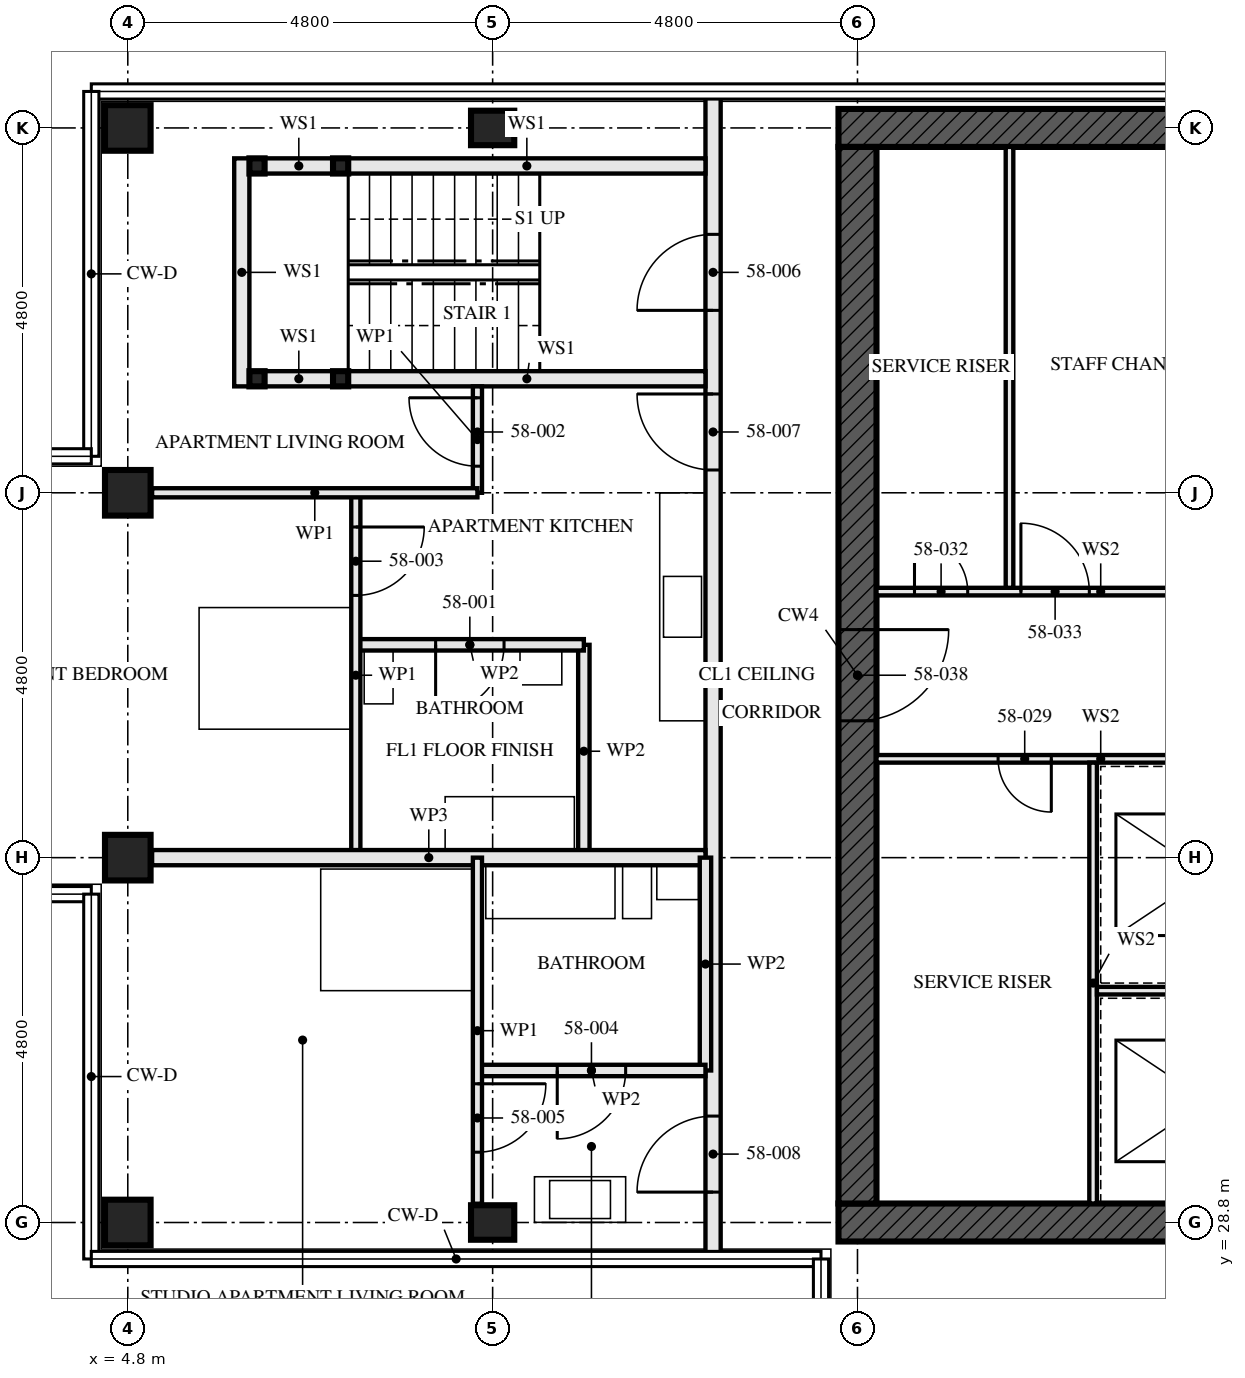
"""IFC4 building model, lengths in metres.
Left out: names, types, materials, properties, quantities, classifications, styles, units other than length and angle.
Written with IfcOpenShell. Run it as: python <this file> out.ifc"""

import sys

from ifc_helpers import new_model, si_unit, direction, frame, frame_2d, origin, origin_2d, place, context, subcontext, project, spatial, rectangle, hollow_rectangle, i_section, extrude, element, fill, save


model = new_model("IFC4")
c1 = context("Model", 3, precision=1e-05, world=origin(), true_north=direction((0.0, 1.0)))
c2 = subcontext(c1, "Body", "Model", "MODEL_VIEW")
j1 = project(units=[si_unit("LENGTHUNIT", "METRE"), si_unit("PLANEANGLEUNIT", "RADIAN")], contexts=[c1])
p1 = place(None, origin())
s1 = spatial("IfcSite", under=j1, at=p1, CompositionType="ELEMENT")
p2 = place(p1, origin())
s2 = spatial("IfcBuilding", under=s1, at=p2, CompositionType="ELEMENT")
p3 = place(p2, frame((0.0, 0.0, 212.0)))
s3 = spatial("IfcBuildingStorey", under=s2, at=p3, CompositionType="ELEMENT", Elevation=212.0)
for number, where, z_axis, x_axis in (
    (1, (4.8, 28.8, 0.0), (0.0, 0.0, 1.0), (0.0, 1.0, 0.0)),
    (2, (4.8, 33.6, 0.0), (0.0, 0.0, 1.0), (0.0, 1.0, 0.0)),
    (3, (4.8, 38.4, 0.0), (0.0, 0.0, 1.0), (0.0, 1.0, 0.0)),
    (4, (4.8, 43.2, 0.0), (0.0, 0.0, 1.0), (0.0, 1.0, 0.0)),
):
    element("IfcColumn", number, at=place(p3, frame(where, z_axis=z_axis, x_axis=x_axis)), inside=s3, PredefinedType="COLUMN", context=c2, shape_type="SweptSolid", body=[
        extrude(hollow_rectangle(XDim=0.6, YDim=0.6, WallThickness=0.05, at=origin_2d()), origin(), (0.0, 0.0, 1.0), 3.5),
    ])
for number, where, z_axis, x_axis in (
    (5, (9.6, 28.8, 0.0), (0.0, 0.0, 1.0), (0.0, 1.0, 0.0)),
    (6, (9.6, 43.2, 0.0), (0.0, 0.0, 1.0), (0.0, 1.0, 0.0)),
):
    element("IfcColumn", number, at=place(p3, frame(where, z_axis=z_axis, x_axis=x_axis)), inside=s3, PredefinedType="COLUMN", context=c2, shape_type="SweptSolid", body=[
        extrude(i_section(OverallWidth=0.454, OverallDepth=0.569, WebThickness=0.078, FlangeThickness=0.125, FilletRadius=0.015, at=origin_2d()), origin(), (0.0, 0.0, 1.0), 3.5),
    ])
p4 = place(p3, frame((14.15, 28.8, -0.17), z_axis=(0.0, 0.0, 1.0), x_axis=(1.0, 0.0, 0.0)))
e7 = element("IfcWall", 7, at=p4, inside=s3, PredefinedType="SHEAR", context=c2, shape_type="SweptSolid", body=[
    extrude(rectangle(XDim=14.9, YDim=0.5, at=frame_2d((7.45, 0.0))), origin(), (0.0, 0.0, 1.0), 3.5),
])
p5 = place(p4, frame((6.85, 0.0, 0.17)))
e8 = element("IfcOpeningElement", 8, at=p5, cuts=e7, PredefinedType="OPENING", context=c2, shape_type="SweptSolid", body=[
    extrude(rectangle(XDim=1.2, YDim=2.1, at=frame_2d((0.6, 1.05))), frame((0.0, 0.26, 0.0), z_axis=(0.0, -1.0, 0.0), x_axis=(1.0, 0.0, 0.0)), (0.0, 0.0, 1.0), 0.521),
])
p6 = place(p3, frame((29.05, 43.2, -0.17), z_axis=(0.0, 0.0, 1.0), x_axis=(-1.0, 0.0, 0.0)))
e9 = element("IfcWall", 9, at=p6, inside=s3, PredefinedType="SHEAR", context=c2, shape_type="SweptSolid", body=[
    extrude(rectangle(XDim=14.9, YDim=0.5, at=frame_2d((7.45, 0.0))), origin(), (0.0, 0.0, 1.0), 3.5),
])
p7 = place(p3, frame((14.4, 42.95, -0.17), z_axis=(0.0, 0.0, 1.0), x_axis=(0.0, -1.0, 0.0)))
e10 = element("IfcWall", 10, at=p7, inside=s3, PredefinedType="SHEAR", context=c2, shape_type="SweptSolid", body=[
    extrude(rectangle(XDim=13.9, YDim=0.5, at=frame_2d((6.95, 0.0))), origin(), (0.0, 0.0, 1.0), 3.5),
])
p8 = place(p7, frame((6.35, 0.0, 0.17)))
e11 = element("IfcOpeningElement", 11, at=p8, cuts=e10, PredefinedType="OPENING", context=c2, shape_type="SweptSolid", body=[
    extrude(rectangle(XDim=1.2, YDim=2.1, at=frame_2d((0.6, 1.05))), frame((0.0, 0.26, 0.0), z_axis=(0.0, -1.0, 0.0), x_axis=(1.0, 0.0, 0.0)), (0.0, 0.0, 1.0), 0.521),
])
for number, where, z_axis, x_axis in (
    (12, (6.5, 42.7, 0.0), (0.0, 0.0, 1.0), (1.0, 0.0, 0.0)),
    (13, (6.5, 39.9, 0.0), (0.0, 0.0, 1.0), (1.0, 0.0, 0.0)),
    (14, (7.6, 42.7, 0.0), (0.0, 0.0, 1.0), (1.0, 0.0, 0.0)),
    (15, (7.6, 39.9, 0.0), (0.0, 0.0, 1.0), (1.0, 0.0, 0.0)),
):
    element("IfcColumn", number, at=place(p3, frame(where, z_axis=z_axis, x_axis=x_axis)), inside=s3, PredefinedType="COLUMN", context=c2, shape_type="SweptSolid", body=[
        extrude(hollow_rectangle(XDim=0.2, YDim=0.2, WallThickness=0.008, at=origin_2d()), origin(), (0.0, 0.0, 1.0), 3.33),
    ])
p9 = place(p3, frame((6.6, 42.7, 0.0), z_axis=(0.0, 0.0, 1.0), x_axis=(1.0, 0.0, 0.0)))
e16 = element("IfcWall", 16, at=p9, inside=s3, PredefinedType="SOLIDWALL", context=c2, shape_type="SweptSolid", body=[
    extrude(rectangle(XDim=0.9, YDim=0.2, at=frame_2d((0.45, 0.0))), origin(), (0.0, 0.0, 1.0), 2.99),
])
p10 = place(p3, frame((7.7, 42.7, 0.0), z_axis=(0.0, 0.0, 1.0), x_axis=(1.0, 0.0, 0.0)))
e17 = element("IfcWall", 17, at=p10, inside=s3, PredefinedType="SOLIDWALL", context=c2, shape_type="SweptSolid", body=[
    extrude(rectangle(XDim=4.7, YDim=0.2, at=frame_2d((2.35, 0.0))), origin(), (0.0, 0.0, 1.0), 2.99),
])
p11 = place(p3, frame((6.6, 39.9, 0.0), z_axis=(0.0, 0.0, 1.0), x_axis=(1.0, 0.0, 0.0)))
e18 = element("IfcWall", 18, at=p11, inside=s3, PredefinedType="SOLIDWALL", context=c2, shape_type="SweptSolid", body=[
    extrude(rectangle(XDim=0.9, YDim=0.2, at=frame_2d((0.45, 0.0))), origin(), (0.0, 0.0, 1.0), 2.99),
])
p12 = place(p3, frame((7.7, 39.9, 0.0), z_axis=(0.0, 0.0, 1.0), x_axis=(1.0, 0.0, 0.0)))
e19 = element("IfcWall", 19, at=p12, inside=s3, PredefinedType="SOLIDWALL", context=c2, shape_type="SweptSolid", body=[
    extrude(rectangle(XDim=4.7, YDim=0.2, at=frame_2d((2.35, 0.0))), origin(), (0.0, 0.0, 1.0), 2.99),
])
p13 = place(p3, frame((6.3, 42.8, 0.0), z_axis=(0.0, 0.0, 1.0), x_axis=(0.0, -1.0, 0.0)))
e20 = element("IfcWall", 20, at=p13, inside=s3, PredefinedType="SOLIDWALL", context=c2, shape_type="SweptSolid", body=[
    extrude(rectangle(XDim=3.0, YDim=0.2, at=frame_2d((1.5, 0.0))), origin(), (0.0, 0.0, 1.0), 3.33),
])
p14 = place(p3, frame((7.8, 36.4, 0.0), z_axis=(0.0, 0.0, 1.0), x_axis=(1.0, 0.0, 0.0)))
e21 = element("IfcWall", 21, at=p14, inside=s3, PredefinedType="PARTITIONING", context=c2, shape_type="SweptSolid", body=[
    extrude(rectangle(XDim=3.0, YDim=0.15, at=frame_2d((1.5, 0.0))), origin(), (0.0, 0.0, 1.0), 3.33),
])
p15 = place(p14, frame((1.05, 0.0, 0.0)))
e22 = element("IfcOpeningElement", 22, at=p15, cuts=e21, PredefinedType="OPENING", context=c2, shape_type="SweptSolid", body=[
    extrude(rectangle(XDim=0.9, YDim=2.1, at=frame_2d((0.45, 1.05))), frame((0.0, 0.085, 0.0), z_axis=(0.0, -1.0, 0.0), x_axis=(1.0, 0.0, 0.0)), (0.0, 0.0, 1.0), 0.171),
])
p16 = place(p3, frame((10.8, 36.4, 0.0), z_axis=(0.0, 0.0, 1.0), x_axis=(0.0, -1.0, 0.0)))
e23 = element("IfcWall", 23, at=p16, inside=s3, PredefinedType="PARTITIONING", context=c2, shape_type="SweptSolid", body=[
    extrude(rectangle(XDim=2.8, YDim=0.15, at=frame_2d((1.4, 0.0))), origin(), (0.0, 0.0, 1.0), 3.33),
])
p17 = place(p3, frame((9.4, 39.8, 0.0), z_axis=(0.0, 0.0, 1.0), x_axis=(0.0, -1.0, 0.0)))
e24 = element("IfcWall", 24, at=p17, inside=s3, PredefinedType="PARTITIONING", context=c2, shape_type="SweptSolid", body=[
    extrude(rectangle(XDim=1.4, YDim=0.12, at=frame_2d((0.7, 0.0))), origin(), (0.0, 0.0, 1.0), 3.33),
])
p18 = place(p17, frame((0.15, 0.0, 0.0)))
e25 = element("IfcOpeningElement", 25, at=p18, cuts=e24, PredefinedType="OPENING", context=c2, shape_type="SweptSolid", body=[
    extrude(rectangle(XDim=0.9, YDim=2.1, at=frame_2d((0.45, 1.05))), frame((0.0, 0.071, 0.0), z_axis=(0.0, -1.0, 0.0), x_axis=(1.0, 0.0, 0.0)), (0.0, 0.0, 1.0), 0.141),
])
p19 = place(p3, frame((7.8, 38.4, 0.0), z_axis=(0.0, 0.0, 1.0), x_axis=(0.0, -1.0, 0.0)))
e26 = element("IfcWall", 26, at=p19, inside=s3, PredefinedType="PARTITIONING", context=c2, shape_type="SweptSolid", body=[
    extrude(rectangle(XDim=4.8, YDim=0.12, at=frame_2d((2.4, 0.0))), origin(), (0.0, 0.0, 1.0), 3.33),
])
p20 = place(p19, frame((0.45, 0.0, 0.0)))
e27 = element("IfcOpeningElement", 27, at=p20, cuts=e26, PredefinedType="OPENING", context=c2, shape_type="SweptSolid", body=[
    extrude(rectangle(XDim=0.9, YDim=2.1, at=frame_2d((0.45, 1.05))), frame((0.0, 0.071, 0.0), z_axis=(0.0, -1.0, 0.0), x_axis=(1.0, 0.0, 0.0)), (0.0, 0.0, 1.0), 0.141),
])
p21 = place(p3, frame((5.12, 38.4, 0.0), z_axis=(0.0, 0.0, 1.0), x_axis=(1.0, 0.0, 0.0)))
e28 = element("IfcWall", 28, at=p21, inside=s3, PredefinedType="PARTITIONING", context=c2, shape_type="SweptSolid", body=[
    extrude(rectangle(XDim=4.28, YDim=0.12, at=frame_2d((2.14, 0.0))), origin(), (0.0, 0.0, 1.0), 2.55),
])
p22 = place(p3, frame((5.12, 33.6, 0.0), z_axis=(0.0, 0.0, 1.0), x_axis=(1.0, 0.0, 0.0)))
e29 = element("IfcWall", 29, at=p22, inside=s3, PredefinedType="PARTITIONING", context=c2, shape_type="SweptSolid", body=[
    extrude(rectangle(XDim=7.28, YDim=0.2, at=frame_2d((3.64, 0.0))), origin(), (0.0, 0.0, 1.0), 2.55),
])
p23 = place(p3, frame((9.4, 30.8, 0.0), z_axis=(0.0, 0.0, 1.0), x_axis=(1.0, 0.0, 0.0)))
e30 = element("IfcWall", 30, at=p23, inside=s3, PredefinedType="PARTITIONING", context=c2, shape_type="SweptSolid", body=[
    extrude(rectangle(XDim=3.0, YDim=0.15, at=frame_2d((1.5, 0.0))), origin(), (0.0, 0.0, 1.0), 3.33),
])
p24 = place(p23, frame((1.05, 0.0, 0.0)))
e31 = element("IfcOpeningElement", 31, at=p24, cuts=e30, PredefinedType="OPENING", context=c2, shape_type="SweptSolid", body=[
    extrude(rectangle(XDim=0.9, YDim=2.1, at=frame_2d((0.45, 1.05))), frame((0.0, 0.085, 0.0), z_axis=(0.0, -1.0, 0.0), x_axis=(1.0, 0.0, 0.0)), (0.0, 0.0, 1.0), 0.171),
])
p25 = place(p3, frame((12.4, 33.6, 0.0), z_axis=(0.0, 0.0, 1.0), x_axis=(0.0, -1.0, 0.0)))
e32 = element("IfcWall", 32, at=p25, inside=s3, PredefinedType="PARTITIONING", context=c2, shape_type="SweptSolid", body=[
    extrude(rectangle(XDim=2.8, YDim=0.15, at=frame_2d((1.4, 0.0))), origin(), (0.0, 0.0, 1.0), 3.33),
])
p26 = place(p3, frame((9.4, 33.6, 0.0), z_axis=(0.0, 0.0, 1.0), x_axis=(0.0, -1.0, 0.0)))
e33 = element("IfcWall", 33, at=p26, inside=s3, PredefinedType="PARTITIONING", context=c2, shape_type="SweptSolid", body=[
    extrude(rectangle(XDim=4.553, YDim=0.12, at=frame_2d((2.276, 0.0))), origin(), (0.0, 0.0, 1.0), 3.33),
])
p27 = place(p26, frame((2.975, 0.0, 0.0)))
e34 = element("IfcOpeningElement", 34, at=p27, cuts=e33, PredefinedType="OPENING", context=c2, shape_type="SweptSolid", body=[
    extrude(rectangle(XDim=0.9, YDim=2.1, at=frame_2d((0.45, 1.05))), frame((0.0, 0.071, 0.0), z_axis=(0.0, -1.0, 0.0), x_axis=(1.0, 0.0, 0.0)), (0.0, 0.0, 1.0), 0.141),
])
p28 = place(p3, frame((12.5, 43.655, 0.0), z_axis=(0.0, 0.0, 1.0), x_axis=(0.0, -1.0, 0.0)))
e35 = element("IfcWall", 35, at=p28, inside=s3, PredefinedType="PARTITIONING", context=c2, shape_type="SweptSolid", body=[
    extrude(rectangle(XDim=15.31, YDim=0.2, at=frame_2d((7.655, 0.0))), origin(), (0.0, 0.0, 1.0), 2.32),
])
p29 = place(p28, frame((1.855, 0.0, 0.0)))
e36 = element("IfcOpeningElement", 36, at=p29, cuts=e35, PredefinedType="OPENING", context=c2, shape_type="SweptSolid", body=[
    extrude(rectangle(XDim=1.0, YDim=2.1, at=frame_2d((0.5, 1.05))), frame((0.0, 0.111, 0.0), z_axis=(0.0, -1.0, 0.0), x_axis=(1.0, 0.0, 0.0)), (0.0, 0.0, 1.0), 0.221),
])
p30 = place(p28, frame((3.955, 0.0, 0.0)))
e37 = element("IfcOpeningElement", 37, at=p30, cuts=e35, PredefinedType="OPENING", context=c2, shape_type="SweptSolid", body=[
    extrude(rectangle(XDim=1.0, YDim=2.1, at=frame_2d((0.5, 1.05))), frame((0.0, 0.111, 0.0), z_axis=(0.0, -1.0, 0.0), x_axis=(1.0, 0.0, 0.0)), (0.0, 0.0, 1.0), 0.221),
])
p31 = place(p28, frame((13.455, 0.0, 0.0)))
e38 = element("IfcOpeningElement", 38, at=p31, cuts=e35, PredefinedType="OPENING", context=c2, shape_type="SweptSolid", body=[
    extrude(rectangle(XDim=1.0, YDim=2.1, at=frame_2d((0.5, 1.05))), frame((0.0, 0.111, 0.0), z_axis=(0.0, -1.0, 0.0), x_axis=(1.0, 0.0, 0.0)), (0.0, 0.0, 1.0), 0.221),
])
p32 = place(p3, frame((16.4, 37.15, 0.0), z_axis=(0.0, 0.0, 1.0), x_axis=(0.0, 1.0, 0.0)))
e39 = element("IfcWall", 39, at=p32, inside=s3, PredefinedType="SOLIDWALL", context=c2, shape_type="SweptSolid", body=[
    extrude(rectangle(XDim=5.8, YDim=0.1, at=frame_2d((2.9, 0.0))), origin(), (0.0, 0.0, 1.0), 3.33),
])
p33 = place(p3, frame((14.65, 34.9, 0.0), z_axis=(0.0, 0.0, 1.0), x_axis=(1.0, 0.0, 0.0)))
e40 = element("IfcWall", 40, at=p33, inside=s3, PredefinedType="SOLIDWALL", context=c2, shape_type="SweptSolid", body=[
    extrude(rectangle(XDim=5.9, YDim=0.1, at=frame_2d((2.95, 0.0))), origin(), (0.0, 0.0, 1.0), 3.33),
])
p34 = place(p33, frame((1.6, 0.0, 0.0)))
e41 = element("IfcOpeningElement", 41, at=p34, cuts=e40, PredefinedType="OPENING", context=c2, shape_type="SweptSolid", body=[
    extrude(rectangle(XDim=0.7, YDim=2.1, at=frame_2d((0.35, 1.05))), frame((0.0, 0.061, 0.0), z_axis=(0.0, -1.0, 0.0), x_axis=(1.0, 0.0, 0.0)), (0.0, 0.0, 1.0), 0.121),
])
p35 = place(p3, frame((14.65, 37.1, 0.0), z_axis=(0.0, 0.0, 1.0), x_axis=(1.0, 0.0, 0.0)))
e42 = element("IfcWall", 42, at=p35, inside=s3, PredefinedType="SOLIDWALL", context=c2, shape_type="SweptSolid", body=[
    extrude(rectangle(XDim=5.9, YDim=0.1, at=frame_2d((2.95, 0.0))), origin(), (0.0, 0.0, 1.0), 3.33),
])
p36 = place(p35, frame((0.5, 0.0, 0.0)))
e43 = element("IfcOpeningElement", 43, at=p36, cuts=e42, PredefinedType="OPENING", context=c2, shape_type="SweptSolid", body=[
    extrude(rectangle(XDim=0.7, YDim=2.1, at=frame_2d((0.35, 1.05))), frame((0.0, 0.061, 0.0), z_axis=(0.0, -1.0, 0.0), x_axis=(1.0, 0.0, 0.0)), (0.0, 0.0, 1.0), 0.121),
])
p37 = place(p35, frame((1.9, 0.0, 0.0)))
e44 = element("IfcOpeningElement", 44, at=p37, cuts=e42, PredefinedType="OPENING", context=c2, shape_type="SweptSolid", body=[
    extrude(rectangle(XDim=0.9, YDim=2.1, at=frame_2d((0.45, 1.05))), frame((0.0, 0.061, 0.0), z_axis=(0.0, -1.0, 0.0), x_axis=(1.0, 0.0, 0.0)), (0.0, 0.0, 1.0), 0.121),
])
p38 = place(p3, frame((17.5, 29.05, 0.0), z_axis=(0.0, 0.0, 1.0), x_axis=(0.0, 1.0, 0.0)))
e45 = element("IfcWall", 45, at=p38, inside=s3, PredefinedType="SOLIDWALL", context=c2, shape_type="SweptSolid", body=[
    extrude(rectangle(XDim=5.8, YDim=0.1, at=frame_2d((2.9, 0.0))), origin(), (0.0, 0.0, 1.0), 3.33),
])
p39 = place(p3, frame((17.55, 31.85, 0.0), z_axis=(0.0, 0.0, 1.0), x_axis=(1.0, 0.0, 0.0)))
e46 = element("IfcWall", 46, at=p39, inside=s3, PredefinedType="SOLIDWALL", context=c2, shape_type="SweptSolid", body=[
    extrude(rectangle(XDim=2.9, YDim=0.1, at=frame_2d((1.45, 0.0))), origin(), (0.0, 0.0, 1.0), 3.33),
])
p40 = place(p15, frame((0.9, 0.0, 0.0), z_axis=(0.0, 0.0, 1.0), x_axis=(-1.0, 0.0, 0.0)))
e47 = element("IfcDoor", 47, at=p40, inside=s3, OperationType="SINGLE_SWING_LEFT", PredefinedType="DOOR", context=c2, shape_type="SweptSolid", body=[
    extrude(rectangle(XDim=0.9, YDim=2.1, at=frame_2d((0.45, 1.05))), frame((0.0, 0.022, 0.0), z_axis=(0.0, -1.0, 0.0), x_axis=(1.0, 0.0, 0.0)), (0.0, 0.0, 1.0), 0.044),
])
fill(e22, e47)
p41 = place(p18, frame((0.9, 0.0, 0.0), z_axis=(0.0, 0.0, 1.0), x_axis=(-1.0, 0.0, 0.0)))
e48 = element("IfcDoor", 48, at=p41, inside=s3, OperationType="SINGLE_SWING_LEFT", PredefinedType="DOOR", context=c2, shape_type="SweptSolid", body=[
    extrude(rectangle(XDim=0.9, YDim=2.1, at=frame_2d((0.45, 1.05))), frame((0.0, 0.022, 0.0), z_axis=(0.0, -1.0, 0.0), x_axis=(1.0, 0.0, 0.0)), (0.0, 0.0, 1.0), 0.044),
])
fill(e25, e48)
p42 = place(p20, origin())
e49 = element("IfcDoor", 49, at=p42, inside=s3, OperationType="SINGLE_SWING_RIGHT", PredefinedType="DOOR", context=c2, shape_type="SweptSolid", body=[
    extrude(rectangle(XDim=0.9, YDim=2.1, at=frame_2d((0.45, 1.05))), frame((0.0, 0.022, 0.0), z_axis=(0.0, -1.0, 0.0), x_axis=(1.0, 0.0, 0.0)), (0.0, 0.0, 1.0), 0.044),
])
fill(e27, e49)
p43 = place(p24, frame((0.9, 0.0, 0.0), z_axis=(0.0, 0.0, 1.0), x_axis=(-1.0, 0.0, 0.0)))
e50 = element("IfcDoor", 50, at=p43, inside=s3, OperationType="SINGLE_SWING_LEFT", PredefinedType="DOOR", context=c2, shape_type="SweptSolid", body=[
    extrude(rectangle(XDim=0.9, YDim=2.1, at=frame_2d((0.45, 1.05))), frame((0.0, 0.022, 0.0), z_axis=(0.0, -1.0, 0.0), x_axis=(1.0, 0.0, 0.0)), (0.0, 0.0, 1.0), 0.044),
])
fill(e31, e50)
p44 = place(p27, origin())
e51 = element("IfcDoor", 51, at=p44, inside=s3, OperationType="SINGLE_SWING_RIGHT", PredefinedType="DOOR", context=c2, shape_type="SweptSolid", body=[
    extrude(rectangle(XDim=0.9, YDim=2.1, at=frame_2d((0.45, 1.05))), frame((0.0, 0.022, 0.0), z_axis=(0.0, -1.0, 0.0), x_axis=(1.0, 0.0, 0.0)), (0.0, 0.0, 1.0), 0.044),
])
fill(e34, e51)
p45 = place(p29, frame((1.0, 0.0, 0.0), z_axis=(0.0, 0.0, 1.0), x_axis=(-1.0, 0.0, 0.0)))
e52 = element("IfcDoor", 52, at=p45, inside=s3, OperationType="SINGLE_SWING_RIGHT", PredefinedType="DOOR", context=c2, shape_type="SweptSolid", body=[
    extrude(rectangle(XDim=1.0, YDim=2.1, at=frame_2d((0.5, 1.05))), frame((0.0, 0.032, 0.0), z_axis=(0.0, -1.0, 0.0), x_axis=(1.0, 0.0, 0.0)), (0.0, 0.0, 1.0), 0.064),
])
fill(e36, e52)
p46 = place(p30, frame((1.0, 0.0, 0.0), z_axis=(0.0, 0.0, 1.0), x_axis=(-1.0, 0.0, 0.0)))
e53 = element("IfcDoor", 53, at=p46, inside=s3, OperationType="SINGLE_SWING_LEFT", PredefinedType="DOOR", context=c2, shape_type="SweptSolid", body=[
    extrude(rectangle(XDim=1.0, YDim=2.1, at=frame_2d((0.5, 1.05))), frame((0.0, 0.027, 0.0), z_axis=(0.0, -1.0, 0.0), x_axis=(1.0, 0.0, 0.0)), (0.0, 0.0, 1.0), 0.054),
])
fill(e37, e53)
p47 = place(p31, frame((1.0, 0.0, 0.0), z_axis=(0.0, 0.0, 1.0), x_axis=(-1.0, 0.0, 0.0)))
e54 = element("IfcDoor", 54, at=p47, inside=s3, OperationType="SINGLE_SWING_RIGHT", PredefinedType="DOOR", context=c2, shape_type="SweptSolid", body=[
    extrude(rectangle(XDim=1.0, YDim=2.1, at=frame_2d((0.5, 1.05))), frame((0.0, 0.027, 0.0), z_axis=(0.0, -1.0, 0.0), x_axis=(1.0, 0.0, 0.0)), (0.0, 0.0, 1.0), 0.054),
])
fill(e38, e54)
p48 = place(p34, frame((0.7, 0.0, 0.0), z_axis=(0.0, 0.0, 1.0), x_axis=(-1.0, 0.0, 0.0)))
e55 = element("IfcDoor", 55, at=p48, inside=s3, OperationType="SINGLE_SWING_RIGHT", PredefinedType="DOOR", context=c2, shape_type="SweptSolid", body=[
    extrude(rectangle(XDim=0.7, YDim=2.1, at=frame_2d((0.35, 1.05))), frame((0.0, 0.027, 0.0), z_axis=(0.0, -1.0, 0.0), x_axis=(1.0, 0.0, 0.0)), (0.0, 0.0, 1.0), 0.054),
])
fill(e41, e55)
p49 = place(p36, origin())
e56 = element("IfcDoor", 56, at=p49, inside=s3, OperationType="SINGLE_SWING_RIGHT", PredefinedType="DOOR", context=c2, shape_type="SweptSolid", body=[
    extrude(rectangle(XDim=0.7, YDim=2.1, at=frame_2d((0.35, 1.05))), frame((0.0, 0.027, 0.0), z_axis=(0.0, -1.0, 0.0), x_axis=(1.0, 0.0, 0.0)), (0.0, 0.0, 1.0), 0.054),
])
fill(e43, e56)
p50 = place(p37, origin())
e57 = element("IfcDoor", 57, at=p50, inside=s3, OperationType="SINGLE_SWING_RIGHT", PredefinedType="DOOR", context=c2, shape_type="SweptSolid", body=[
    extrude(rectangle(XDim=0.9, YDim=2.1, at=frame_2d((0.45, 1.05))), frame((0.0, 0.027, 0.0), z_axis=(0.0, -1.0, 0.0), x_axis=(1.0, 0.0, 0.0)), (0.0, 0.0, 1.0), 0.054),
])
fill(e44, e57)
p51 = place(p8, origin())
e58 = element("IfcDoor", 58, at=p51, inside=s3, OperationType="SINGLE_SWING_LEFT", PredefinedType="DOOR", context=c2, shape_type="SweptSolid", body=[
    extrude(rectangle(XDim=1.2, YDim=2.1, at=frame_2d((0.6, 1.05))), frame((0.0, 0.027, 0.0), z_axis=(0.0, -1.0, 0.0), x_axis=(1.0, 0.0, 0.0)), (0.0, 0.0, 1.0), 0.054),
])
fill(e11, e58)
save(model, sys.argv[1])
